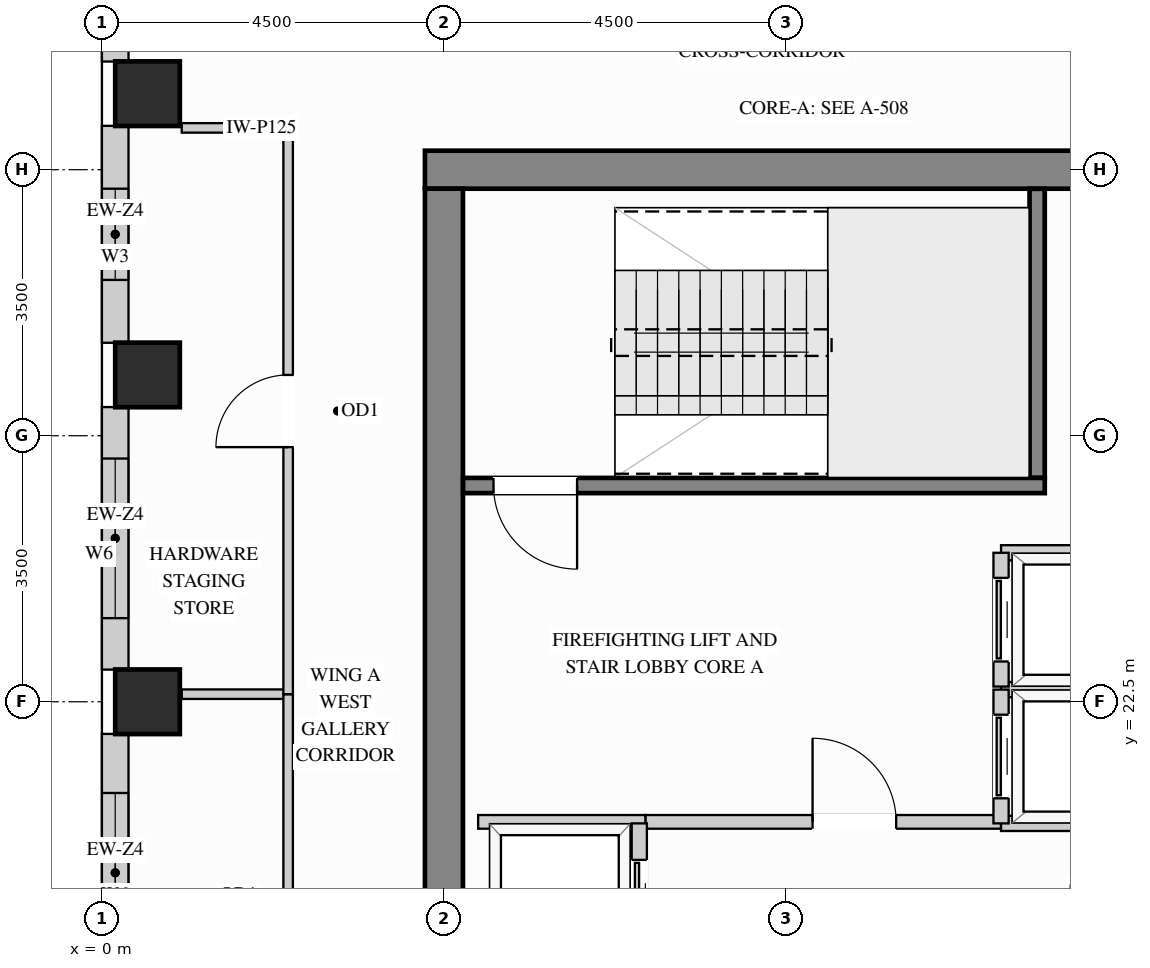
"""IFC4 building model, lengths in metres.
Left out: names, types, materials, properties, quantities, classifications, styles, units other than length and angle.
Written with IfcOpenShell. Run it as: python <this file> out.ifc"""

import sys

from ifc_helpers import new_model, si_unit, direction, frame, frame_2d, origin, origin_2d, place, context, subcontext, project, spatial, rectangle, extrude, source, transform, mapped, element, fill, save


model = new_model("IFC4")
c1 = context("Model", 3, precision=1e-05, world=origin(), true_north=direction((0.0, 1.0)))
c2 = subcontext(c1, "Body", "Model", "MODEL_VIEW")
j1 = project(units=[si_unit("LENGTHUNIT", "METRE"), si_unit("PLANEANGLEUNIT", "RADIAN")], contexts=[c1])
p1 = place(None, origin())
s1 = spatial("IfcSite", under=j1, at=p1, CompositionType="ELEMENT")
p2 = place(p1, origin())
s2 = spatial("IfcBuilding", under=s1, at=p2, CompositionType="ELEMENT")
p3 = place(p2, frame((0.0, 0.0, 266.4)))
s3 = spatial("IfcBuildingStorey", under=s2, at=p3, CompositionType="ELEMENT", Elevation=266.4)
m1 = source(origin(), c2, "Body", "SweptSolid", [
    extrude(rectangle(XDim=0.85, YDim=0.85, at=origin_2d()), origin(), (0.0, 0.0, 1.0), 3.4),
])
for number, where, z_axis, x_axis in (
    (1, (0.6, 22.5, 0.0), (0.0, 0.0, 1.0), (1.0, 0.0, 0.0)),
    (2, (0.6, 26.8, 0.0), (0.0, 0.0, 1.0), (1.0, 0.0, 0.0)),
    (3, (0.6, 30.5, 0.0), (0.0, 0.0, 1.0), (1.0, 0.0, 0.0)),
):
    element("IfcColumn", number, at=place(p3, frame(where, z_axis=z_axis, x_axis=x_axis)), inside=s3, PredefinedType="COLUMN", context=c2, shape_type="MappedRepresentation", body=[
        mapped(m1, transform((0.0, 0.0, 0.0), x_axis=(1.0, 0.0, 0.0), y_axis=(0.0, 1.0, 0.0), z_axis=(0.0, 0.0, 1.0))),
    ])
m2 = source(origin(), c2, "Body", "SweptSolid", [
    extrude(rectangle(XDim=10.5, YDim=0.5, at=frame_2d((5.25, 0.0))), origin(), (0.0, 0.0, 1.0), 3.4),
])
p4 = place(p3, frame((4.25, 29.5, 0.0), z_axis=(0.0, 0.0, 1.0), x_axis=(1.0, 0.0, 0.0)))
e4 = element("IfcWall", 4, at=p4, inside=s3, PredefinedType="SHEAR", context=c2, shape_type="MappedRepresentation", body=[
    mapped(m2, transform((0.0, 0.0, 0.0), x_axis=(1.0, 0.0, 0.0), y_axis=(0.0, 1.0, 0.0), z_axis=(0.0, 0.0, 1.0))),
])
m3 = source(origin(), c2, "Body", "SweptSolid", [
    extrude(rectangle(XDim=20.5, YDim=0.5, at=frame_2d((10.25, 0.0))), origin(), (0.0, 0.0, 1.0), 3.4),
])
p5 = place(p3, frame((4.5, 8.75, 0.0), z_axis=(0.0, 0.0, 1.0), x_axis=(0.0, 1.0, 0.0)))
e5 = element("IfcWall", 5, at=p5, inside=s3, PredefinedType="SHEAR", context=c2, shape_type="MappedRepresentation", body=[
    mapped(m3, transform((0.0, 0.0, 0.0), x_axis=(1.0, 0.0, 0.0), y_axis=(0.0, 1.0, 0.0), z_axis=(0.0, 0.0, 1.0))),
])
m4 = source(origin(), c2, "Body", "SweptSolid", [
    extrude(rectangle(XDim=0.527, YDim=0.35, at=frame_2d((0.263, 0.0))), origin(), (0.0, 0.0, 1.0), 3.385),
])
p6 = place(p3, frame((0.175, 31.45, 0.0), z_axis=(0.0, 0.0, 1.0), x_axis=(0.0, -1.0, 0.0)))
e6 = element("IfcWall", 6, at=p6, inside=s3, PredefinedType="SOLIDWALL", context=c2, shape_type="MappedRepresentation", body=[
    mapped(m4, transform((0.0, 0.0, 0.0), x_axis=(1.0, 0.0, 0.0), y_axis=(0.0, 1.0, 0.0), z_axis=(0.0, 0.0, 1.0))),
])
p7 = place(p3, frame((0.175, 30.077, 0.0), z_axis=(0.0, 0.0, 1.0), x_axis=(0.0, -1.0, 0.0)))
e7 = element("IfcWall", 7, at=p7, inside=s3, PredefinedType="SOLIDWALL", context=c2, shape_type="SweptSolid", body=[
    extrude(rectangle(XDim=2.854, YDim=0.35, at=frame_2d((1.427, 0.0))), origin(), (0.0, 0.0, 1.0), 3.385),
])
p8 = place(p7, frame((0.827, 0.0, 0.78)))
e8 = element("IfcOpeningElement", 8, at=p8, cuts=e7, PredefinedType="OPENING", context=c2, shape_type="SweptSolid", body=[
    extrude(rectangle(XDim=1.2, YDim=2.25, at=frame_2d((0.6, 1.125))), frame((0.0, 0.185, 0.0), z_axis=(0.0, -1.0, 0.0), x_axis=(1.0, 0.0, 0.0)), (0.0, 0.0, 1.0), 0.37),
])
p9 = place(p3, frame((0.175, 26.377, 0.0), z_axis=(0.0, 0.0, 1.0), x_axis=(0.0, -1.0, 0.0)))
e9 = element("IfcWall", 9, at=p9, inside=s3, PredefinedType="SOLIDWALL", context=c2, shape_type="SweptSolid", body=[
    extrude(rectangle(XDim=3.454, YDim=0.35, at=frame_2d((1.727, 0.0))), origin(), (0.0, 0.0, 1.0), 3.385),
])
p10 = place(p9, frame((0.677, 0.0, 0.78)))
e10 = element("IfcOpeningElement", 10, at=p10, cuts=e9, PredefinedType="OPENING", context=c2, shape_type="SweptSolid", body=[
    extrude(rectangle(XDim=2.1, YDim=2.25, at=frame_2d((1.05, 1.125))), frame((0.0, 0.185, 0.0), z_axis=(0.0, -1.0, 0.0), x_axis=(1.0, 0.0, 0.0)), (0.0, 0.0, 1.0), 0.37),
])
p11 = place(p3, frame((0.175, 22.077, 0.0), z_axis=(0.0, 0.0, 1.0), x_axis=(0.0, -1.0, 0.0)))
e11 = element("IfcWall", 11, at=p11, inside=s3, PredefinedType="SOLIDWALL", context=c2, shape_type="SweptSolid", body=[
    extrude(rectangle(XDim=3.654, YDim=0.35, at=frame_2d((1.827, 0.0))), origin(), (0.0, 0.0, 1.0), 3.385),
])
p12 = place(p11, frame((0.777, 0.0, 0.78)))
e12 = element("IfcOpeningElement", 12, at=p12, cuts=e11, PredefinedType="OPENING", context=c2, shape_type="SweptSolid", body=[
    extrude(rectangle(XDim=2.1, YDim=2.25, at=frame_2d((1.05, 1.125))), frame((0.0, 0.185, 0.0), z_axis=(0.0, -1.0, 0.0), x_axis=(1.0, 0.0, 0.0)), (0.0, 0.0, 1.0), 0.37),
])
p13 = place(p3, frame((7.15, 20.92, 0.0), z_axis=(0.0, 0.0, 1.0), x_axis=(1.0, 0.0, 0.0)))
e13 = element("IfcWall", 13, at=p13, inside=s3, PredefinedType="PARTITIONING", context=c2, shape_type="SweptSolid", body=[
    extrude(rectangle(XDim=4.68, YDim=0.18, at=frame_2d((2.34, 0.0))), origin(), (0.0, 0.0, 1.0), 3.385),
])
p14 = place(p13, frame((2.2, 0.0, 0.0)))
e14 = element("IfcOpeningElement", 14, at=p14, cuts=e13, PredefinedType="OPENING", context=c2, shape_type="SweptSolid", body=[
    extrude(rectangle(XDim=1.1, YDim=2.15, at=frame_2d((0.55, 1.075))), frame((0.0, 0.1, 0.0), z_axis=(0.0, -1.0, 0.0), x_axis=(1.0, 0.0, 0.0)), (0.0, 0.0, 1.0), 0.2),
])
m5 = source(origin(), c2, "Body", "SweptSolid", [
    extrude(rectangle(XDim=2.2, YDim=0.18, at=frame_2d((1.1, 0.0))), origin(), (0.0, 0.0, 1.0), 3.385),
])
p15 = place(p3, frame((4.95, 20.92, 0.0), z_axis=(0.0, 0.0, 1.0), x_axis=(1.0, 0.0, 0.0)))
e15 = element("IfcWall", 15, at=p15, inside=s3, PredefinedType="PARTITIONING", context=c2, shape_type="MappedRepresentation", body=[
    mapped(m5, transform((0.0, 0.0, 0.0), x_axis=(1.0, 0.0, 0.0), y_axis=(0.0, 1.0, 0.0), z_axis=(0.0, 0.0, 1.0))),
])
m6 = source(origin(), c2, "Body", "SweptSolid", [
    extrude(rectangle(XDim=1.4, YDim=0.125, at=frame_2d((0.7, 0.0))), origin(), (0.0, 0.0, 1.0), 3.385),
])
for number, where, z_axis, x_axis in (
    (16, (1.05, 30.05, 0.0), (0.0, 0.0, 1.0), (1.0, 0.0, 0.0)),
    (17, (1.05, 22.6, 0.0), (0.0, 0.0, 1.0), (1.0, 0.0, 0.0)),
):
    element("IfcWall", number, at=place(p3, frame(where, z_axis=z_axis, x_axis=x_axis)), inside=s3, PredefinedType="PARTITIONING", context=c2, shape_type="MappedRepresentation", body=[
        mapped(m6, transform((0.0, 0.0, 0.0), x_axis=(1.0, 0.0, 0.0), y_axis=(0.0, 1.0, 0.0), z_axis=(0.0, 0.0, 1.0))),
    ])
p16 = place(p3, frame((2.45, 15.1, 0.0), z_axis=(0.0, 0.0, 1.0), x_axis=(0.0, 1.0, 0.0)))
e18 = element("IfcWall", 18, at=p16, inside=s3, PredefinedType="PARTITIONING", context=c2, shape_type="SweptSolid", body=[
    extrude(rectangle(XDim=7.5, YDim=0.125, at=frame_2d((3.75, 0.0))), origin(), (0.0, 0.0, 1.0), 3.385),
])
p17 = place(p16, frame((3.275, 0.0, 0.0)))
e19 = element("IfcOpeningElement", 19, at=p17, cuts=e18, PredefinedType="OPENING", context=c2, shape_type="SweptSolid", body=[
    extrude(rectangle(XDim=0.95, YDim=2.15, at=frame_2d((0.475, 1.075))), frame((0.0, 0.073, 0.0), z_axis=(0.0, -1.0, 0.0), x_axis=(1.0, 0.0, 0.0)), (0.0, 0.0, 1.0), 0.145),
])
p18 = place(p3, frame((2.45, 22.6, 0.0), z_axis=(0.0, 0.0, 1.0), x_axis=(0.0, 1.0, 0.0)))
e20 = element("IfcWall", 20, at=p18, inside=s3, PredefinedType="PARTITIONING", context=c2, shape_type="SweptSolid", body=[
    extrude(rectangle(XDim=7.45, YDim=0.125, at=frame_2d((3.725, 0.0))), origin(), (0.0, 0.0, 1.0), 3.385),
])
p19 = place(p18, frame((3.25, 0.0, 0.0)))
e21 = element("IfcOpeningElement", 21, at=p19, cuts=e20, PredefinedType="OPENING", context=c2, shape_type="SweptSolid", body=[
    extrude(rectangle(XDim=0.95, YDim=2.15, at=frame_2d((0.475, 1.075))), frame((0.0, 0.073, 0.0), z_axis=(0.0, -1.0, 0.0), x_axis=(1.0, 0.0, 0.0)), (0.0, 0.0, 1.0), 0.145),
])
m7 = source(origin(), c2, "Body", "SweptSolid", [
    extrude(rectangle(XDim=2.39, YDim=0.2, at=frame_2d((1.195, 0.0))), origin(), (0.0, 0.0, 1.0), 3.385),
])
for number, where, z_axis, x_axis in (
    (22, (11.83, 22.66, 0.0), (0.0, 0.0, 1.0), (1.0, 0.0, 0.0)),
    (23, (11.83, 20.9, 0.0), (0.0, 0.0, 1.0), (1.0, 0.0, 0.0)),
):
    element("IfcWall", number, at=place(p3, frame(where, z_axis=z_axis, x_axis=x_axis)), inside=s3, PredefinedType="PARTITIONING", context=c2, shape_type="MappedRepresentation", body=[
        mapped(m7, transform((0.0, 0.0, 0.0), x_axis=(1.0, 0.0, 0.0), y_axis=(0.0, 1.0, 0.0), z_axis=(0.0, 0.0, 1.0))),
    ])
p20 = place(p3, frame((11.83, 20.9, 0.0), z_axis=(0.0, 0.0, 1.0), x_axis=(0.0, 1.0, 0.0)))
e24 = element("IfcWall", 24, at=p20, inside=s3, PredefinedType="PARTITIONING", context=c2, shape_type="SweptSolid", body=[
    extrude(rectangle(XDim=1.76, YDim=0.2, at=frame_2d((0.88, 0.0))), origin(), (0.0, 0.0, 1.0), 3.385),
])
p21 = place(p20, frame((0.33, 0.0, 0.0)))
e25 = element("IfcOpeningElement", 25, at=p21, cuts=e24, PredefinedType="OPENING", context=c2, shape_type="SweptSolid", body=[
    extrude(rectangle(XDim=1.1, YDim=2.2, at=frame_2d((0.55, 1.1))), frame((0.0, 0.11, 0.0), z_axis=(0.0, -1.0, 0.0), x_axis=(1.0, 0.0, 0.0)), (0.0, 0.0, 1.0), 0.22),
])
p22 = place(p3, frame((11.83, 24.46, 0.0), z_axis=(0.0, 0.0, 1.0), x_axis=(1.0, 0.0, 0.0)))
e26 = element("IfcWall", 26, at=p22, inside=s3, PredefinedType="PARTITIONING", context=c2, shape_type="MappedRepresentation", body=[
    mapped(m7, transform((0.0, 0.0, 0.0), x_axis=(1.0, 0.0, 0.0), y_axis=(0.0, 1.0, 0.0), z_axis=(0.0, 0.0, 1.0))),
])
p23 = place(p3, frame((11.83, 22.7, 0.0), z_axis=(0.0, 0.0, 1.0), x_axis=(0.0, 1.0, 0.0)))
e27 = element("IfcWall", 27, at=p23, inside=s3, PredefinedType="PARTITIONING", context=c2, shape_type="SweptSolid", body=[
    extrude(rectangle(XDim=1.76, YDim=0.2, at=frame_2d((0.88, 0.0))), origin(), (0.0, 0.0, 1.0), 3.385),
])
p24 = place(p23, frame((0.33, 0.0, 0.0)))
e28 = element("IfcOpeningElement", 28, at=p24, cuts=e27, PredefinedType="OPENING", context=c2, shape_type="SweptSolid", body=[
    extrude(rectangle(XDim=1.1, YDim=2.2, at=frame_2d((0.55, 1.1))), frame((0.0, 0.11, 0.0), z_axis=(0.0, -1.0, 0.0), x_axis=(1.0, 0.0, 0.0)), (0.0, 0.0, 1.0), 0.22),
])
p25 = place(p3, frame((7.07, 18.84, 0.0), z_axis=(0.0, 0.0, 1.0), x_axis=(0.0, 1.0, 0.0)))
e29 = element("IfcWall", 29, at=p25, inside=s3, PredefinedType="PARTITIONING", context=c2, shape_type="SweptSolid", body=[
    extrude(rectangle(XDim=2.06, YDim=0.2, at=frame_2d((1.03, 0.0))), origin(), (0.0, 0.0, 1.0), 3.385),
])
p26 = place(p25, frame((0.48, 0.0, 0.0)))
e30 = element("IfcOpeningElement", 30, at=p26, cuts=e29, PredefinedType="OPENING", context=c2, shape_type="SweptSolid", body=[
    extrude(rectangle(XDim=1.1, YDim=2.2, at=frame_2d((0.55, 1.1))), frame((0.0, 0.11, 0.0), z_axis=(0.0, -1.0, 0.0), x_axis=(1.0, 0.0, 0.0)), (0.0, 0.0, 1.0), 0.22),
])
m8 = source(origin(), c2, "Body", "SweptSolid", [
    extrude(rectangle(XDim=3.803, YDim=0.2, at=frame_2d((1.901, 0.0))), origin(), (0.0, 0.0, 1.0), 3.4),
])
p27 = place(p3, frame((12.305, 25.445, 0.0), z_axis=(0.0, 0.0, 1.0), x_axis=(0.0, 1.0, 0.0)))
e31 = element("IfcWall", 31, at=p27, inside=s3, PredefinedType="SHEAR", context=c2, shape_type="MappedRepresentation", body=[
    mapped(m8, transform((0.0, 0.0, 0.0), x_axis=(1.0, 0.0, 0.0), y_axis=(0.0, 1.0, 0.0), z_axis=(0.0, 0.0, 1.0))),
])
p28 = place(p3, frame((4.752, 25.345, 0.0), z_axis=(0.0, 0.0, 1.0), x_axis=(1.0, 0.0, 0.0)))
e32 = element("IfcWall", 32, at=p28, inside=s3, PredefinedType="SHEAR", context=c2, shape_type="SweptSolid", body=[
    extrude(rectangle(XDim=7.653, YDim=0.2, at=frame_2d((3.827, 0.0))), origin(), (0.0, 0.0, 1.0), 3.4),
])
p29 = place(p28, frame((0.4, 0.0, 0.0)))
e33 = element("IfcOpeningElement", 33, at=p29, cuts=e32, PredefinedType="OPENING", context=c2, shape_type="SweptSolid", body=[
    extrude(rectangle(XDim=1.1, YDim=2.15, at=frame_2d((0.55, 1.075))), frame((0.0, 0.11, 0.0), z_axis=(0.0, -1.0, 0.0), x_axis=(1.0, 0.0, 0.0)), (0.0, 0.0, 1.0), 0.22),
])
m9 = source(origin(), c2, "Body", "SweptSolid", [
    extrude(rectangle(XDim=1.1, YDim=2.15, at=frame_2d((0.55, 1.075))), frame((0.0, 0.025, 0.0), z_axis=(0.0, -1.0, 0.0), x_axis=(1.0, 0.0, 0.0)), (0.0, 0.0, 1.0), 0.05),
])
p30 = place(p14, origin())
e34 = element("IfcDoor", 34, at=p30, inside=s3, OperationType="SINGLE_SWING_LEFT", PredefinedType="DOOR", context=c2, shape_type="MappedRepresentation", body=[
    mapped(m9, transform((0.0, 0.0, 0.0), x_axis=(1.0, 0.0, 0.0), y_axis=(0.0, 1.0, 0.0), z_axis=(0.0, 0.0, 1.0))),
])
fill(e14, e34)
m10 = source(origin(), c2, "Body", "SweptSolid", [
    extrude(rectangle(XDim=1.1, YDim=2.2, at=frame_2d((0.55, 1.1))), frame((0.0, 0.025, 0.0), z_axis=(0.0, -1.0, 0.0), x_axis=(1.0, 0.0, 0.0)), (0.0, 0.0, 1.0), 0.05),
])
p31 = place(p21, origin())
e35 = element("IfcDoor", 35, at=p31, inside=s3, OperationType="SLIDING_TO_LEFT", PredefinedType="DOOR", context=c2, shape_type="MappedRepresentation", body=[
    mapped(m10, transform((0.0, 0.0, 0.0), x_axis=(1.0, 0.0, 0.0), y_axis=(0.0, 1.0, 0.0), z_axis=(0.0, 0.0, 1.0))),
])
fill(e25, e35)
p32 = place(p24, origin())
e36 = element("IfcDoor", 36, at=p32, inside=s3, OperationType="SLIDING_TO_LEFT", PredefinedType="DOOR", context=c2, shape_type="MappedRepresentation", body=[
    mapped(m10, transform((0.0, 0.0, 0.0), x_axis=(1.0, 0.0, 0.0), y_axis=(0.0, 1.0, 0.0), z_axis=(0.0, 0.0, 1.0))),
])
fill(e28, e36)
p33 = place(p26, origin())
e37 = element("IfcDoor", 37, at=p33, inside=s3, OperationType="SLIDING_TO_LEFT", PredefinedType="DOOR", context=c2, shape_type="MappedRepresentation", body=[
    mapped(m10, transform((0.0, 0.0, 0.0), x_axis=(1.0, 0.0, 0.0), y_axis=(0.0, 1.0, 0.0), z_axis=(0.0, 0.0, 1.0))),
])
fill(e30, e37)
m11 = source(origin(), c2, "Body", "SweptSolid", [
    extrude(rectangle(XDim=0.95, YDim=2.15, at=frame_2d((0.475, 1.075))), frame((0.0, 0.025, 0.0), z_axis=(0.0, -1.0, 0.0), x_axis=(1.0, 0.0, 0.0)), (0.0, 0.0, 1.0), 0.05),
])
p34 = place(p19, origin())
e38 = element("IfcDoor", 38, at=p34, inside=s3, OperationType="SINGLE_SWING_LEFT", PredefinedType="DOOR", context=c2, shape_type="MappedRepresentation", body=[
    mapped(m11, transform((0.0, 0.0, 0.0), x_axis=(1.0, 0.0, 0.0), y_axis=(0.0, 1.0, 0.0), z_axis=(0.0, 0.0, 1.0))),
])
fill(e21, e38)
m12 = source(origin(), c2, "Body", "SweptSolid", [
    extrude(rectangle(XDim=1.1, YDim=2.15, at=frame_2d((0.55, 1.075))), frame((0.0, 0.025, 0.0), z_axis=(0.0, -1.0, 0.0), x_axis=(1.0, 0.0, 0.0)), (0.0, 0.0, 1.0), 0.05),
])
p35 = place(p29, origin())
e39 = element("IfcDoor", 39, at=p35, inside=s3, OperationType="SINGLE_SWING_RIGHT", PredefinedType="DOOR", context=c2, shape_type="MappedRepresentation", body=[
    mapped(m12, transform((0.0, 0.0, 0.0), x_axis=(1.0, 0.0, 0.0), y_axis=(0.0, 1.0, 0.0), z_axis=(0.0, 0.0, 1.0))),
])
fill(e33, e39)
m13 = source(origin(), c2, "Body", "SweptSolid", [
    extrude(rectangle(XDim=1.2, YDim=2.25, at=frame_2d((0.6, 1.125))), frame((0.0, 0.03, 0.0), z_axis=(0.0, -1.0, 0.0), x_axis=(1.0, 0.0, 0.0)), (0.0, 0.0, 1.0), 0.06),
])
p36 = place(p8, origin())
e40 = element("IfcWindow", 40, at=p36, inside=s3, PartitioningType="SINGLE_PANEL", PredefinedType="WINDOW", context=c2, shape_type="MappedRepresentation", body=[
    mapped(m13, transform((0.0, 0.0, 0.0), x_axis=(1.0, 0.0, 0.0), y_axis=(0.0, 1.0, 0.0), z_axis=(0.0, 0.0, 1.0))),
])
fill(e8, e40)
m14 = source(origin(), c2, "Body", "SweptSolid", [
    extrude(rectangle(XDim=2.1, YDim=2.25, at=frame_2d((1.05, 1.125))), frame((0.0, 0.03, 0.0), z_axis=(0.0, -1.0, 0.0), x_axis=(1.0, 0.0, 0.0)), (0.0, 0.0, 1.0), 0.06),
])
p37 = place(p10, origin())
e41 = element("IfcWindow", 41, at=p37, inside=s3, PartitioningType="SINGLE_PANEL", PredefinedType="WINDOW", context=c2, shape_type="MappedRepresentation", body=[
    mapped(m14, transform((0.0, 0.0, 0.0), x_axis=(1.0, 0.0, 0.0), y_axis=(0.0, 1.0, 0.0), z_axis=(0.0, 0.0, 1.0))),
])
fill(e10, e41)
p38 = place(p12, origin())
e42 = element("IfcWindow", 42, at=p38, inside=s3, PartitioningType="SINGLE_PANEL", PredefinedType="WINDOW", context=c2, shape_type="MappedRepresentation", body=[
    mapped(m14, transform((0.0, 0.0, 0.0), x_axis=(1.0, 0.0, 0.0), y_axis=(0.0, 1.0, 0.0), z_axis=(0.0, 0.0, 1.0))),
])
fill(e12, e42)
save(model, sys.argv[1])
